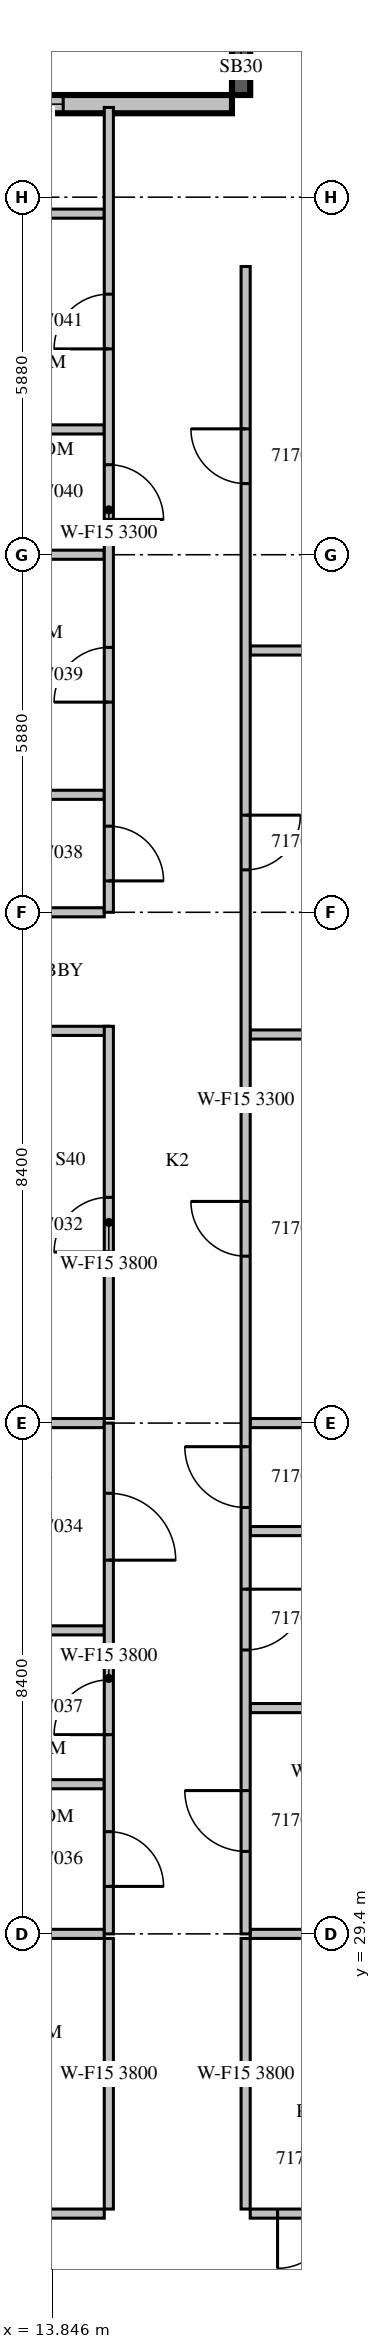
"""IFC4 building model, lengths in metres.
Left out: names, types, materials, properties, quantities, classifications, styles, units other than length and angle.
Written with IfcOpenShell. Run it as: python <this file> out.ifc"""

import sys

from ifc_helpers import new_model, si_unit, direction, frame, frame_2d, origin, place, context, subcontext, project, spatial, rectangle, extrude, source, transform, mapped, element, fill, save


model = new_model("IFC4")
c1 = context("Model", 3, precision=1e-05, world=origin(), true_north=direction((0.0, 1.0)))
c2 = subcontext(c1, "Body", "Model", "MODEL_VIEW")
j1 = project(units=[si_unit("LENGTHUNIT", "METRE"), si_unit("PLANEANGLEUNIT", "RADIAN")], contexts=[c1])
p1 = place(None, origin())
s1 = spatial("IfcSite", under=j1, at=p1, CompositionType="ELEMENT")
p2 = place(p1, origin())
s2 = spatial("IfcBuilding", under=s1, at=p2, CompositionType="ELEMENT")
p3 = place(p2, frame((0.0, 0.0, 82.5)))
s3 = spatial("IfcBuildingStorey", under=s2, at=p3, CompositionType="ELEMENT", Elevation=82.5)
m1 = source(origin(), c2, "Body", "SweptSolid", [
    extrude(rectangle(XDim=1.68, YDim=0.3, at=frame_2d((0.84, 0.0))), origin(), (0.0, 0.0, 1.0), 3.8),
])
p4 = place(p3, frame((16.95, 61.32, 0.0), z_axis=(0.0, 0.0, 1.0), x_axis=(0.0, -1.0, 0.0)))
e1 = element("IfcWall", 1, at=p4, inside=s3, PredefinedType="SOLIDWALL", context=c2, shape_type="MappedRepresentation", body=[
    mapped(m1, transform((0.0, 0.0, 0.0), scale=1.0)),
])
m2 = source(origin(), c2, "Body", "SweptSolid", [
    extrude(rectangle(XDim=0.9, YDim=2.7, at=frame_2d((0.45, 1.35))), frame((0.0, 0.16, 0.0), z_axis=(0.0, -1.0, 0.0), x_axis=(1.0, 0.0, 0.0)), (0.0, 0.0, 1.0), 0.32),
])
p5 = place(p4, frame((0.39, 0.0, 0.6)))
e2 = element("IfcOpeningElement", 2, at=p5, cuts=e1, PredefinedType="OPENING", context=c2, shape_type="MappedRepresentation", body=[
    mapped(m2, transform((0.0, 0.0, 0.0), scale=1.0)),
])
m3 = source(origin(), c2, "Body", "SweptSolid", [
    extrude(rectangle(XDim=8.4, YDim=0.3, at=frame_2d((4.2, 0.0))), origin(), (0.0, 0.0, 1.0), 3.8),
])
p6 = place(p3, frame((16.8, 59.49, 0.0), z_axis=(0.0, 0.0, 1.0), x_axis=(-1.0, 0.0, 0.0)))
e3 = element("IfcWall", 3, at=p6, inside=s3, PredefinedType="STANDARD", context=c2, shape_type="MappedRepresentation", body=[
    mapped(m3, transform((0.0, 0.0, 0.0), scale=1.0)),
])
m4 = source(origin(), c2, "Body", "SweptSolid", [
    extrude(rectangle(XDim=1.8, YDim=2.7, at=frame_2d((0.9, 1.35))), frame((0.0, 0.16, 0.0), z_axis=(0.0, -1.0, 0.0), x_axis=(1.0, 0.0, 0.0)), (0.0, 0.0, 1.0), 0.32),
])
p7 = place(p6, frame((2.775, 0.0, 0.6)))
e4 = element("IfcOpeningElement", 4, at=p7, cuts=e3, PredefinedType="OPENING", context=c2, shape_type="MappedRepresentation", body=[
    mapped(m4, transform((0.0, 0.0, 0.0), scale=1.0)),
])
p8 = place(p6, frame((5.925, 0.0, 0.6)))
e5 = element("IfcOpeningElement", 5, at=p8, cuts=e3, PredefinedType="OPENING", context=c2, shape_type="MappedRepresentation", body=[
    mapped(m4, transform((0.0, 0.0, 0.0), scale=1.0)),
])
m5 = source(origin(), c2, "Body", "SweptSolid", [
    extrude(rectangle(XDim=11.625, YDim=0.15, at=frame_2d((5.812, 0.0))), origin(), (0.0, 0.0, 1.0), 2.8),
])
p9 = place(p3, frame((3.075, 24.8, 0.0), z_axis=(0.0, 0.0, 1.0), x_axis=(1.0, 0.0, 0.0)))
e6 = element("IfcWall", 6, at=p9, inside=s3, PredefinedType="PARTITIONING", context=c2, shape_type="MappedRepresentation", body=[
    mapped(m5, transform((0.0, 0.0, 0.0), scale=1.0)),
])
m6 = source(origin(), c2, "Body", "SweptSolid", [
    extrude(rectangle(XDim=0.9, YDim=2.1, at=frame_2d((0.45, 1.05))), frame((0.0, 0.085, 0.0), z_axis=(0.0, -1.0, 0.0), x_axis=(1.0, 0.0, 0.0)), (0.0, 0.0, 1.0), 0.17),
])
p10 = place(p9, frame((2.663, 0.0, 0.0)))
e7 = element("IfcOpeningElement", 7, at=p10, cuts=e6, PredefinedType="OPENING", context=c2, shape_type="MappedRepresentation", body=[
    mapped(m6, transform((0.0, 0.0, 0.0), scale=1.0)),
])
p11 = place(p9, frame((9.35, 0.0, 0.0)))
e8 = element("IfcOpeningElement", 8, at=p11, cuts=e6, PredefinedType="OPENING", context=c2, shape_type="MappedRepresentation", body=[
    mapped(m6, transform((0.0, 0.0, 0.0), scale=1.0)),
])
m7 = source(origin(), c2, "Body", "SweptSolid", [
    extrude(rectangle(XDim=3.6, YDim=0.15, at=frame_2d((1.8, 0.0))), origin(), (0.0, 0.0, 1.0), 3.8),
])
p12 = place(p3, frame((17.1, 24.8, 0.0), z_axis=(0.0, 0.0, 1.0), x_axis=(1.0, 0.0, 0.0)))
e9 = element("IfcWall", 9, at=p12, inside=s3, PredefinedType="PARTITIONING", context=c2, shape_type="MappedRepresentation", body=[
    mapped(m7, transform((0.0, 0.0, 0.0), scale=1.0)),
])
p13 = place(p12, frame((0.45, 0.0, 0.0)))
e10 = element("IfcOpeningElement", 10, at=p13, cuts=e9, PredefinedType="OPENING", context=c2, shape_type="MappedRepresentation", body=[
    mapped(m6, transform((0.0, 0.0, 0.0), scale=1.0)),
])
m8 = source(origin(), c2, "Body", "SweptSolid", [
    extrude(rectangle(XDim=4.45, YDim=0.15, at=frame_2d((2.225, 0.0))), origin(), (0.0, 0.0, 1.0), 3.8),
])
for number, where, z_axis, x_axis in (
    (11, (14.775, 24.875, 0.0), (0.0, 0.0, 1.0), (0.0, 1.0, 0.0)),
    (12, (17.025, 29.325, 0.0), (0.0, 0.0, 1.0), (0.0, -1.0, 0.0)),
):
    element("IfcWall", number, at=place(p3, frame(where, z_axis=z_axis, x_axis=x_axis)), inside=s3, PredefinedType="PARTITIONING", context=c2, shape_type="MappedRepresentation", body=[
        mapped(m8, transform((0.0, 0.0, 0.0), scale=1.0)),
    ])
m9 = source(origin(), c2, "Body", "SweptSolid", [
    extrude(rectangle(XDim=3.601, YDim=0.15, at=frame_2d((1.8, 0.0))), origin(), (0.0, 0.0, 1.0), 3.8),
])
p14 = place(p3, frame((14.7, 29.4, 0.0), z_axis=(0.0, 0.0, 1.0), x_axis=(-1.0, 0.0, 0.0)))
e13 = element("IfcWall", 13, at=p14, inside=s3, PredefinedType="PARTITIONING", context=c2, shape_type="MappedRepresentation", body=[
    mapped(m9, transform((0.0, 0.0, 0.0), scale=1.0)),
])
m10 = source(origin(), c2, "Body", "SweptSolid", [
    extrude(rectangle(XDim=2.701, YDim=0.15, at=frame_2d((1.351, 0.0))), origin(), (0.0, 0.0, 1.0), 3.8),
])
p15 = place(p3, frame((19.801, 29.4, 0.0), z_axis=(0.0, 0.0, 1.0), x_axis=(-1.0, 0.0, 0.0)))
e14 = element("IfcWall", 14, at=p15, inside=s3, PredefinedType="PARTITIONING", context=c2, shape_type="MappedRepresentation", body=[
    mapped(m10, transform((0.0, 0.0, 0.0), scale=1.0)),
])
m11 = source(origin(), c2, "Body", "SweptSolid", [
    extrude(rectangle(XDim=2.875, YDim=0.15, at=frame_2d((1.438, 0.0))), origin(), (0.0, 0.0, 1.0), 3.8),
])
p16 = place(p3, frame((14.775, 44.25, 0.0), z_axis=(0.0, 0.0, 1.0), x_axis=(-1.0, 0.0, 0.0)))
e15 = element("IfcWall", 15, at=p16, inside=s3, PredefinedType="PARTITIONING", context=c2, shape_type="MappedRepresentation", body=[
    mapped(m11, transform((0.0, 0.0, 0.0), scale=1.0)),
])
m12 = source(origin(), c2, "Body", "SweptSolid", [
    extrude(rectangle(XDim=6.45, YDim=0.15, at=frame_2d((3.225, 0.0))), origin(), (0.0, 0.0, 1.0), 3.8),
])
p17 = place(p3, frame((14.775, 37.875, 0.0), z_axis=(0.0, 0.0, 1.0), x_axis=(0.0, 1.0, 0.0)))
e16 = element("IfcWall", 16, at=p17, inside=s3, PredefinedType="PARTITIONING", context=c2, shape_type="MappedRepresentation", body=[
    mapped(m12, transform((0.0, 0.0, 0.0), scale=1.0)),
])
p18 = place(p17, frame((2.737, 0.0, 0.0)))
e17 = element("IfcOpeningElement", 17, at=p18, cuts=e16, PredefinedType="OPENING", context=c2, shape_type="MappedRepresentation", body=[
    mapped(m6, transform((0.0, 0.0, 0.0), scale=1.0)),
])
m13 = source(origin(), c2, "Body", "SweptSolid", [
    extrude(rectangle(XDim=3.45, YDim=0.15, at=frame_2d((1.725, 0.0))), origin(), (0.0, 0.0, 1.0), 3.8),
])
for number, where, z_axis, x_axis in (
    (18, (14.7, 31.861, 0.0), (0.0, 0.0, 1.0), (-1.0, 0.0, 0.0)),
    (19, (14.7, 34.391, 0.0), (0.0, 0.0, 1.0), (-1.0, 0.0, 0.0)),
    (20, (14.7, 37.8, 0.0), (0.0, 0.0, 1.0), (-1.0, 0.0, 0.0)),
    (21, (14.7, 48.132, 0.0), (0.0, 0.0, 1.0), (-1.0, 0.0, 0.0)),
    (22, (14.7, 52.08, 0.0), (0.0, 0.0, 1.0), (-1.0, 0.0, 0.0)),
    (23, (14.7, 54.141, 0.0), (0.0, 0.0, 1.0), (-1.0, 0.0, 0.0)),
):
    element("IfcWall", number, at=place(p3, frame(where, z_axis=z_axis, x_axis=x_axis)), inside=s3, PredefinedType="PARTITIONING", context=c2, shape_type="MappedRepresentation", body=[
        mapped(m13, transform((0.0, 0.0, 0.0), scale=1.0)),
    ])
p19 = place(p3, frame((14.7, 57.689, 0.0), z_axis=(0.0, 0.0, 1.0), x_axis=(-1.0, 0.0, 0.0)))
e24 = element("IfcWall", 24, at=p19, inside=s3, PredefinedType="PARTITIONING", context=c2, shape_type="MappedRepresentation", body=[
    mapped(m13, transform((0.0, 0.0, 0.0), scale=1.0)),
])
p20 = place(p19, frame((1.275, 0.0, 0.0)))
e25 = element("IfcOpeningElement", 25, at=p20, cuts=e24, PredefinedType="OPENING", context=c2, shape_type="MappedRepresentation", body=[
    mapped(m6, transform((0.0, 0.0, 0.0), scale=1.0)),
])
p21 = place(p3, frame((14.7, 46.2, 0.0), z_axis=(0.0, 0.0, 1.0), x_axis=(-1.0, 0.0, 0.0)))
e26 = element("IfcWall", 26, at=p21, inside=s3, PredefinedType="PARTITIONING", context=c2, shape_type="MappedRepresentation", body=[
    mapped(m13, transform((0.0, 0.0, 0.0), scale=1.0)),
])
for number, where, z_axis, x_axis in (
    (27, (17.1, 33.113, 0.0), (0.0, 0.0, 1.0), (1.0, 0.0, 0.0)),
    (28, (17.1, 36.024, 0.0), (0.0, 0.0, 1.0), (1.0, 0.0, 0.0)),
    (29, (17.1, 44.19, 0.0), (0.0, 0.0, 1.0), (1.0, 0.0, 0.0)),
):
    element("IfcWall", number, at=place(p3, frame(where, z_axis=z_axis, x_axis=x_axis)), inside=s3, PredefinedType="PARTITIONING", context=c2, shape_type="MappedRepresentation", body=[
        mapped(m7, transform((0.0, 0.0, 0.0), scale=1.0)),
    ])
m14 = source(origin(), c2, "Body", "SweptSolid", [
    extrude(rectangle(XDim=3.6, YDim=0.15, at=frame_2d((1.8, 0.0))), origin(), (0.0, 0.0, 1.0), 2.8),
])
p22 = place(p3, frame((17.1, 50.505, 0.0), z_axis=(0.0, 0.0, 1.0), x_axis=(1.0, 0.0, 0.0)))
e30 = element("IfcWall", 30, at=p22, inside=s3, PredefinedType="PARTITIONING", context=c2, shape_type="MappedRepresentation", body=[
    mapped(m14, transform((0.0, 0.0, 0.0), scale=1.0)),
])
p23 = place(p3, frame((19.801, 37.8, 0.0), z_axis=(0.0, 0.0, 1.0), x_axis=(-1.0, 0.0, 0.0)))
e31 = element("IfcWall", 31, at=p23, inside=s3, PredefinedType="PARTITIONING", context=c2, shape_type="MappedRepresentation", body=[
    mapped(m10, transform((0.0, 0.0, 0.0), scale=1.0)),
])
m15 = source(origin(), c2, "Body", "SweptSolid", [
    extrude(rectangle(XDim=8.4, YDim=0.15, at=frame_2d((4.2, 0.0))), origin(), (0.0, 0.0, 1.0), 3.8),
])
p24 = place(p3, frame((14.775, 29.4, 0.0), z_axis=(0.0, 0.0, 1.0), x_axis=(0.0, 1.0, 0.0)))
e32 = element("IfcWall", 32, at=p24, inside=s3, PredefinedType="PARTITIONING", context=c2, shape_type="MappedRepresentation", body=[
    mapped(m15, transform((0.0, 0.0, 0.0), scale=1.0)),
])
m16 = source(origin(), c2, "Body", "SweptSolid", [
    extrude(rectangle(XDim=1.1, YDim=2.1, at=frame_2d((0.55, 1.05))), frame((0.0, 0.085, 0.0), z_axis=(0.0, -1.0, 0.0), x_axis=(1.0, 0.0, 0.0)), (0.0, 0.0, 1.0), 0.17),
])
p25 = place(p24, frame((6.146, 0.0, 0.0)))
e33 = element("IfcOpeningElement", 33, at=p25, cuts=e32, PredefinedType="OPENING", context=c2, shape_type="MappedRepresentation", body=[
    mapped(m16, transform((0.0, 0.0, 0.0), scale=1.0)),
])
p26 = place(p24, frame((0.781, 0.0, 0.0)))
e34 = element("IfcOpeningElement", 34, at=p26, cuts=e32, PredefinedType="OPENING", context=c2, shape_type="MappedRepresentation", body=[
    mapped(m6, transform((0.0, 0.0, 0.0), scale=1.0)),
])
p27 = place(p24, frame((3.276, 0.0, 0.0)))
e35 = element("IfcOpeningElement", 35, at=p27, cuts=e32, PredefinedType="OPENING", context=c2, shape_type="MappedRepresentation", body=[
    mapped(m6, transform((0.0, 0.0, 0.0), scale=1.0)),
])
m17 = source(origin(), c2, "Body", "SweptSolid", [
    extrude(rectangle(XDim=13.235, YDim=0.15, at=frame_2d((6.617, 0.0))), origin(), (0.0, 0.0, 1.0), 3.3),
])
p28 = place(p3, frame((14.775, 46.2, 0.0), z_axis=(0.0, 0.0, 1.0), x_axis=(0.0, 1.0, 0.0)))
e36 = element("IfcWall", 36, at=p28, inside=s3, PredefinedType="PARTITIONING", context=c2, shape_type="MappedRepresentation", body=[
    mapped(m17, transform((0.0, 0.0, 0.0), scale=1.0)),
])
p29 = place(p28, frame((0.516, 0.0, 0.0)))
e37 = element("IfcOpeningElement", 37, at=p29, cuts=e36, PredefinedType="OPENING", context=c2, shape_type="MappedRepresentation", body=[
    mapped(m6, transform((0.0, 0.0, 0.0), scale=1.0)),
])
p30 = place(p28, frame((3.456, 0.0, 0.0)))
e38 = element("IfcOpeningElement", 38, at=p30, cuts=e36, PredefinedType="OPENING", context=c2, shape_type="MappedRepresentation", body=[
    mapped(m6, transform((0.0, 0.0, 0.0), scale=1.0)),
])
p31 = place(p28, frame((6.46, 0.0, 0.0)))
e39 = element("IfcOpeningElement", 39, at=p31, cuts=e36, PredefinedType="OPENING", context=c2, shape_type="MappedRepresentation", body=[
    mapped(m6, transform((0.0, 0.0, 0.0), scale=1.0)),
])
p32 = place(p28, frame((9.265, 0.0, 0.0)))
e40 = element("IfcOpeningElement", 40, at=p32, cuts=e36, PredefinedType="OPENING", context=c2, shape_type="MappedRepresentation", body=[
    mapped(m6, transform((0.0, 0.0, 0.0), scale=1.0)),
])
p33 = place(p3, frame((17.025, 56.82, 0.0), z_axis=(0.0, 0.0, 1.0), x_axis=(0.0, -1.0, 0.0)))
e41 = element("IfcWall", 41, at=p33, inside=s3, PredefinedType="PARTITIONING", context=c2, shape_type="SweptSolid", body=[
    extrude(rectangle(XDim=27.42, YDim=0.15, at=frame_2d((13.71, 0.0))), origin(), (0.0, 0.0, 1.0), 3.3),
])
m18 = source(origin(), c2, "Body", "SweptSolid", [
    extrude(rectangle(XDim=1.0, YDim=2.1, at=frame_2d((0.5, 1.05))), frame((0.0, 0.085, 0.0), z_axis=(0.0, -1.0, 0.0), x_axis=(1.0, 0.0, 0.0)), (0.0, 0.0, 1.0), 0.17),
])
p34 = place(p33, frame((25.063, 0.0, 0.0)))
e42 = element("IfcOpeningElement", 42, at=p34, cuts=e41, PredefinedType="OPENING", context=c2, shape_type="MappedRepresentation", body=[
    mapped(m18, transform((0.0, 0.0, 0.0), scale=1.0)),
])
p35 = place(p33, frame((21.751, 0.0, 0.0)))
e43 = element("IfcOpeningElement", 43, at=p35, cuts=e41, PredefinedType="OPENING", context=c2, shape_type="MappedRepresentation", body=[
    mapped(m18, transform((0.0, 0.0, 0.0), scale=1.0)),
])
p36 = place(p33, frame((19.408, 0.0, 0.0)))
e44 = element("IfcOpeningElement", 44, at=p36, cuts=e41, PredefinedType="OPENING", context=c2, shape_type="MappedRepresentation", body=[
    mapped(m18, transform((0.0, 0.0, 0.0), scale=1.0)),
])
p37 = place(p33, frame((15.375, 0.0, 0.0)))
e45 = element("IfcOpeningElement", 45, at=p37, cuts=e41, PredefinedType="OPENING", context=c2, shape_type="MappedRepresentation", body=[
    mapped(m6, transform((0.0, 0.0, 0.0), scale=1.0)),
])
p38 = place(p33, frame((9.023, 0.0, 0.0)))
e46 = element("IfcOpeningElement", 46, at=p38, cuts=e41, PredefinedType="OPENING", context=c2, shape_type="MappedRepresentation", body=[
    mapped(m6, transform((0.0, 0.0, 0.0), scale=1.0)),
])
p39 = place(p33, frame((2.67, 0.0, 0.0)))
e47 = element("IfcOpeningElement", 47, at=p39, cuts=e41, PredefinedType="OPENING", context=c2, shape_type="MappedRepresentation", body=[
    mapped(m6, transform((0.0, 0.0, 0.0), scale=1.0)),
])
m19 = source(origin(), c2, "Body", "SweptSolid", [
    extrude(rectangle(XDim=0.9, YDim=2.7, at=frame_2d((0.45, 1.35))), frame((0.0, 0.03, 0.0), z_axis=(0.0, -1.0, 0.0), x_axis=(1.0, 0.0, 0.0)), (0.0, 0.0, 1.0), 0.06),
])
p40 = place(p5, origin())
e48 = element("IfcWindow", 48, at=p40, inside=s3, PartitioningType="SINGLE_PANEL", PredefinedType="WINDOW", context=c2, shape_type="MappedRepresentation", body=[
    mapped(m19, transform((0.0, 0.0, 0.0), scale=1.0)),
])
fill(e2, e48)
m20 = source(origin(), c2, "Body", "SweptSolid", [
    extrude(rectangle(XDim=1.8, YDim=2.7, at=frame_2d((0.9, 1.35))), frame((0.0, 0.03, 0.0), z_axis=(0.0, -1.0, 0.0), x_axis=(1.0, 0.0, 0.0)), (0.0, 0.0, 1.0), 0.06),
])
p41 = place(p7, origin())
e49 = element("IfcWindow", 49, at=p41, inside=s3, PartitioningType="SINGLE_PANEL", PredefinedType="WINDOW", context=c2, shape_type="MappedRepresentation", body=[
    mapped(m20, transform((0.0, 0.0, 0.0), scale=1.0)),
])
fill(e4, e49)
m21 = source(origin(), c2, "Body", "SweptSolid", [
    extrude(rectangle(XDim=0.9, YDim=2.1, at=frame_2d((0.45, 1.05))), frame((0.0, 0.025, 0.0), z_axis=(0.0, -1.0, 0.0), x_axis=(1.0, 0.0, 0.0)), (0.0, 0.0, 1.0), 0.05),
])
p42 = place(p13, origin())
e50 = element("IfcDoor", 50, at=p42, inside=s3, OperationType="SINGLE_SWING_RIGHT", PredefinedType="DOOR", context=c2, shape_type="MappedRepresentation", body=[
    mapped(m21, transform((0.0, 0.0, 0.0), scale=1.0)),
])
fill(e10, e50)
p43 = place(p18, origin())
e51 = element("IfcDoor", 51, at=p43, inside=s3, OperationType="SINGLE_SWING_LEFT", PredefinedType="DOOR", context=c2, shape_type="MappedRepresentation", body=[
    mapped(m21, transform((0.0, 0.0, 0.0), scale=1.0)),
])
fill(e17, e51)
m22 = source(origin(), c2, "Body", "SweptSolid", [
    extrude(rectangle(XDim=1.1, YDim=2.1, at=frame_2d((0.55, 1.05))), frame((0.0, 0.025, 0.0), z_axis=(0.0, -1.0, 0.0), x_axis=(1.0, 0.0, 0.0)), (0.0, 0.0, 1.0), 0.05),
])
p44 = place(p25, origin())
e52 = element("IfcDoor", 52, at=p44, inside=s3, OperationType="SINGLE_SWING_RIGHT", PredefinedType="DOOR", context=c2, shape_type="MappedRepresentation", body=[
    mapped(m22, transform((0.0, 0.0, 0.0), scale=1.0)),
])
fill(e33, e52)
p45 = place(p26, origin())
e53 = element("IfcDoor", 53, at=p45, inside=s3, OperationType="SINGLE_SWING_RIGHT", PredefinedType="DOOR", context=c2, shape_type="MappedRepresentation", body=[
    mapped(m21, transform((0.0, 0.0, 0.0), scale=1.0)),
])
fill(e34, e53)
p46 = place(p27, origin())
e54 = element("IfcDoor", 54, at=p46, inside=s3, OperationType="SINGLE_SWING_LEFT", PredefinedType="DOOR", context=c2, shape_type="MappedRepresentation", body=[
    mapped(m21, transform((0.0, 0.0, 0.0), scale=1.0)),
])
fill(e35, e54)
p47 = place(p29, origin())
e55 = element("IfcDoor", 55, at=p47, inside=s3, OperationType="SINGLE_SWING_RIGHT", PredefinedType="DOOR", context=c2, shape_type="MappedRepresentation", body=[
    mapped(m21, transform((0.0, 0.0, 0.0), scale=1.0)),
])
fill(e37, e55)
p48 = place(p30, origin())
e56 = element("IfcDoor", 56, at=p48, inside=s3, OperationType="SINGLE_SWING_LEFT", PredefinedType="DOOR", context=c2, shape_type="MappedRepresentation", body=[
    mapped(m21, transform((0.0, 0.0, 0.0), scale=1.0)),
])
fill(e38, e56)
p49 = place(p31, origin())
e57 = element("IfcDoor", 57, at=p49, inside=s3, OperationType="SINGLE_SWING_RIGHT", PredefinedType="DOOR", context=c2, shape_type="MappedRepresentation", body=[
    mapped(m21, transform((0.0, 0.0, 0.0), scale=1.0)),
])
fill(e39, e57)
p50 = place(p32, origin())
e58 = element("IfcDoor", 58, at=p50, inside=s3, OperationType="SINGLE_SWING_LEFT", PredefinedType="DOOR", context=c2, shape_type="MappedRepresentation", body=[
    mapped(m21, transform((0.0, 0.0, 0.0), scale=1.0)),
])
fill(e40, e58)
m23 = source(origin(), c2, "Body", "SweptSolid", [
    extrude(rectangle(XDim=1.0, YDim=2.1, at=frame_2d((0.5, 1.05))), frame((0.0, 0.025, 0.0), z_axis=(0.0, -1.0, 0.0), x_axis=(1.0, 0.0, 0.0)), (0.0, 0.0, 1.0), 0.05),
])
p51 = place(p34, origin())
e59 = element("IfcDoor", 59, at=p51, inside=s3, OperationType="SINGLE_SWING_RIGHT", PredefinedType="DOOR", context=c2, shape_type="MappedRepresentation", body=[
    mapped(m23, transform((0.0, 0.0, 0.0), scale=1.0)),
])
fill(e42, e59)
p52 = place(p35, origin())
e60 = element("IfcDoor", 60, at=p52, inside=s3, OperationType="SINGLE_SWING_LEFT", PredefinedType="DOOR", context=c2, shape_type="MappedRepresentation", body=[
    mapped(m23, transform((0.0, 0.0, 0.0), scale=1.0)),
])
fill(e43, e60)
p53 = place(p36, origin())
e61 = element("IfcDoor", 61, at=p53, inside=s3, OperationType="SINGLE_SWING_RIGHT", PredefinedType="DOOR", context=c2, shape_type="MappedRepresentation", body=[
    mapped(m23, transform((0.0, 0.0, 0.0), scale=1.0)),
])
fill(e44, e61)
p54 = place(p37, origin())
e62 = element("IfcDoor", 62, at=p54, inside=s3, OperationType="SINGLE_SWING_RIGHT", PredefinedType="DOOR", context=c2, shape_type="MappedRepresentation", body=[
    mapped(m21, transform((0.0, 0.0, 0.0), scale=1.0)),
])
fill(e45, e62)
p55 = place(p38, origin())
e63 = element("IfcDoor", 63, at=p55, inside=s3, OperationType="SINGLE_SWING_LEFT", PredefinedType="DOOR", context=c2, shape_type="MappedRepresentation", body=[
    mapped(m21, transform((0.0, 0.0, 0.0), scale=1.0)),
])
fill(e46, e63)
p56 = place(p39, origin())
e64 = element("IfcDoor", 64, at=p56, inside=s3, OperationType="SINGLE_SWING_RIGHT", PredefinedType="DOOR", context=c2, shape_type="MappedRepresentation", body=[
    mapped(m21, transform((0.0, 0.0, 0.0), scale=1.0)),
])
fill(e47, e64)
save(model, sys.argv[1])
